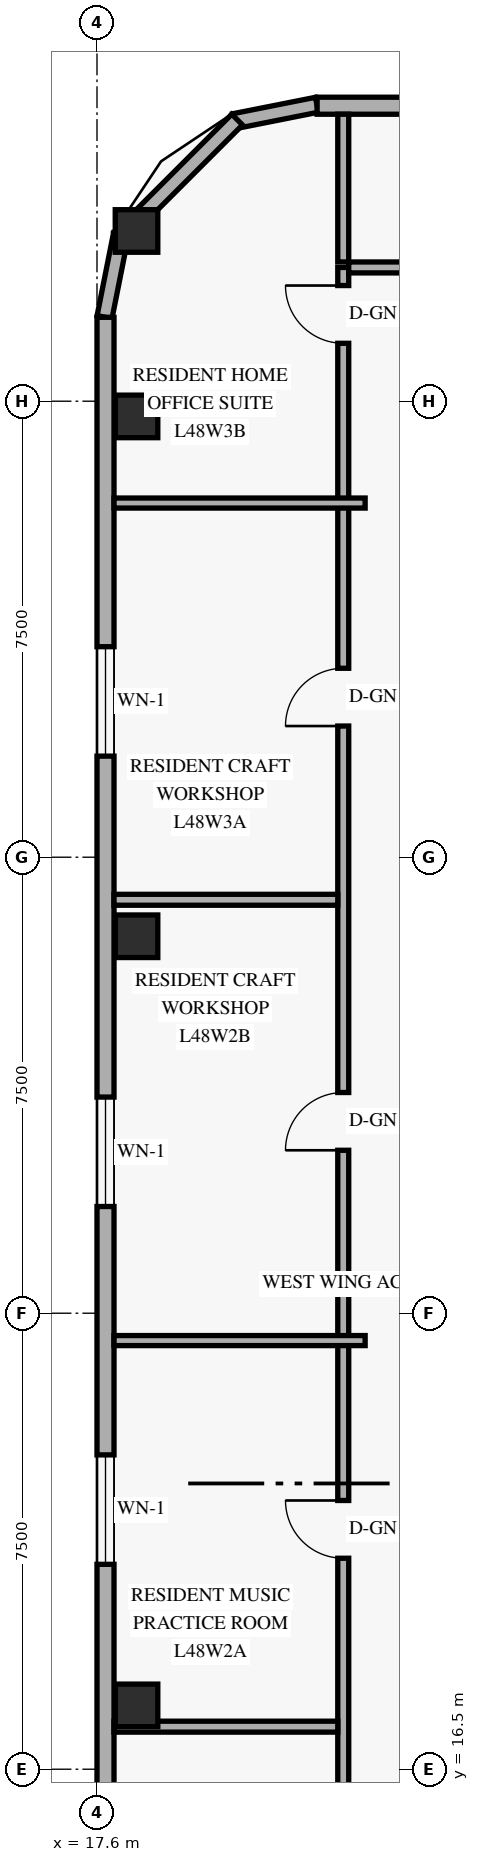
"""IFC4 building model, lengths in metres.
Left out: names, types, materials, properties, quantities, classifications, styles, units other than length and angle.
Written with IfcOpenShell. Run it as: python <this file> out.ifc"""

import sys

from ifc_helpers import new_model, si_unit, direction, frame, frame_2d, origin, origin_2d, place, context, subcontext, project, spatial, rectangle, extrude, element, fill, save


model = new_model("IFC4")
c1 = context("Model", 3, precision=1e-05, world=origin(), true_north=direction((0.0, 1.0)))
c2 = subcontext(c1, "Body", "Model", "MODEL_VIEW")
j1 = project(units=[si_unit("LENGTHUNIT", "METRE"), si_unit("PLANEANGLEUNIT", "RADIAN")], contexts=[c1])
p1 = place(None, origin())
s1 = spatial("IfcSite", under=j1, at=p1, CompositionType="ELEMENT")
p2 = place(p1, origin())
s2 = spatial("IfcBuilding", under=s1, at=p2, CompositionType="ELEMENT")
p3 = place(p2, frame((0.0, 0.0, 184.8)))
s3 = spatial("IfcBuildingStorey", under=s2, at=p3, CompositionType="ELEMENT", Elevation=184.8)
for number, where, z_axis, x_axis in (
    (1, (18.25, 17.55, 0.0), (0.0, 0.0, 1.0), (1.0, 0.0, 0.0)),
    (2, (18.25, 30.2, 0.0), (0.0, 0.0, 1.0), (1.0, 0.0, 0.0)),
    (3, (18.25, 38.75, 0.0), (0.0, 0.0, 1.0), (1.0, 0.0, 0.0)),
    (4, (18.25, 41.8, 0.0), (0.0, 0.0, 1.0), (1.0, 0.0, 0.0)),
):
    element("IfcColumn", number, at=place(p3, frame(where, z_axis=z_axis, x_axis=x_axis)), inside=s3, PredefinedType="COLUMN", context=c2, shape_type="SweptSolid", body=[
        extrude(rectangle(XDim=0.7, YDim=0.7, at=origin_2d()), origin(), (0.0, 0.0, 1.0), 3.6),
    ])
p4 = place(p3, frame((21.217, 43.876, 0.0), z_axis=(0.0, 0.0, 1.0), x_axis=(-0.980809899341, -0.19496651342, 0.0)))
e5 = element("IfcWall", 5, at=p4, inside=s3, PredefinedType="SOLIDWALL", context=c2, shape_type="SweptSolid", body=[
    extrude(rectangle(XDim=1.389, YDim=0.25, at=frame_2d((0.694, 0.0))), origin(), (0.0, 0.0, 1.0), 3.36),
])
p5 = place(p3, frame((19.905, 43.632, 0.0), z_axis=(0.0, 0.0, 1.0), x_axis=(-0.707106781187, -0.707106781187, 0.0)))
e6 = element("IfcWall", 6, at=p5, inside=s3, PredefinedType="SOLIDWALL", context=c2, shape_type="SweptSolid", body=[
    extrude(rectangle(XDim=2.739, YDim=0.25, at=frame_2d((1.37, 0.0))), origin(), (0.0, 0.0, 1.0), 3.36),
])
p6 = place(p3, frame((17.995, 41.746, 0.0), z_axis=(0.0, 0.0, 1.0), x_axis=(-0.195135625965, -0.9807762678, 0.0)))
e7 = element("IfcWall", 7, at=p6, inside=s3, PredefinedType="SOLIDWALL", context=c2, shape_type="SweptSolid", body=[
    extrude(rectangle(XDim=1.389, YDim=0.25, at=frame_2d((0.694, 0.0))), origin(), (0.0, 0.0, 1.0), 3.36),
])
p7 = place(p3, frame((54.98, 43.86, 0.0), z_axis=(0.0, 0.0, 1.0), x_axis=(-1.0, 0.0, 0.0)))
e8 = element("IfcWall", 8, at=p7, inside=s3, PredefinedType="SOLIDWALL", context=c2, shape_type="SweptSolid", body=[
    extrude(rectangle(XDim=33.76, YDim=0.28, at=frame_2d((16.88, 0.0))), origin(), (0.0, 0.0, 1.0), 3.36),
])
p8 = place(p7, frame((28.555, 0.0, 0.85)))
e9 = element("IfcOpeningElement", 9, at=p8, cuts=e8, PredefinedType="OPENING", context=c2, shape_type="SweptSolid", body=[
    extrude(rectangle(XDim=1.65, YDim=1.6, at=frame_2d((0.825, 0.8))), frame((0.0, 0.15, 0.0), z_axis=(0.0, -1.0, 0.0), x_axis=(1.0, 0.0, 0.0)), (0.0, 0.0, 1.0), 0.3),
])
p9 = place(p7, frame((21.67, 0.0, 0.85)))
e10 = element("IfcOpeningElement", 10, at=p9, cuts=e8, PredefinedType="OPENING", context=c2, shape_type="SweptSolid", body=[
    extrude(rectangle(XDim=1.65, YDim=1.6, at=frame_2d((0.825, 0.8))), frame((0.0, 0.15, 0.0), z_axis=(0.0, -1.0, 0.0), x_axis=(1.0, 0.0, 0.0)), (0.0, 0.0, 1.0), 0.3),
])
p10 = place(p7, frame((14.957, 0.0, 0.85)))
e11 = element("IfcOpeningElement", 11, at=p10, cuts=e8, PredefinedType="OPENING", context=c2, shape_type="SweptSolid", body=[
    extrude(rectangle(XDim=1.65, YDim=1.6, at=frame_2d((0.825, 0.8))), frame((0.0, 0.15, 0.0), z_axis=(0.0, -1.0, 0.0), x_axis=(1.0, 0.0, 0.0)), (0.0, 0.0, 1.0), 0.3),
])
p11 = place(p7, frame((9.108, 0.0, 0.85)))
e12 = element("IfcOpeningElement", 12, at=p11, cuts=e8, PredefinedType="OPENING", context=c2, shape_type="SweptSolid", body=[
    extrude(rectangle(XDim=1.65, YDim=1.6, at=frame_2d((0.825, 0.8))), frame((0.0, 0.15, 0.0), z_axis=(0.0, -1.0, 0.0), x_axis=(1.0, 0.0, 0.0)), (0.0, 0.0, 1.0), 0.3),
])
p12 = place(p7, frame((6.363, 0.0, 0.85)))
e13 = element("IfcOpeningElement", 13, at=p12, cuts=e8, PredefinedType="OPENING", context=c2, shape_type="SweptSolid", body=[
    extrude(rectangle(XDim=1.2, YDim=1.5, at=frame_2d((0.6, 0.75))), frame((0.0, 0.15, 0.0), z_axis=(0.0, -1.0, 0.0), x_axis=(1.0, 0.0, 0.0)), (0.0, 0.0, 1.0), 0.3),
])
p13 = place(p7, frame((2.207, 0.0, 0.85)))
e14 = element("IfcOpeningElement", 14, at=p13, cuts=e8, PredefinedType="OPENING", context=c2, shape_type="SweptSolid", body=[
    extrude(rectangle(XDim=1.65, YDim=1.6, at=frame_2d((0.825, 0.8))), frame((0.0, 0.15, 0.0), z_axis=(0.0, -1.0, 0.0), x_axis=(1.0, 0.0, 0.0)), (0.0, 0.0, 1.0), 0.3),
])
p14 = place(p3, frame((17.74, 40.38, 0.0), z_axis=(0.0, 0.0, 1.0), x_axis=(0.0, -1.0, 0.0)))
e15 = element("IfcWall", 15, at=p14, inside=s3, PredefinedType="SOLIDWALL", context=c2, shape_type="SweptSolid", body=[
    extrude(rectangle(XDim=32.76, YDim=0.28, at=frame_2d((16.38, 0.0))), origin(), (0.0, 0.0, 1.0), 3.36),
])
p15 = place(p14, frame((25.363, 0.0, 0.85)))
e16 = element("IfcOpeningElement", 16, at=p15, cuts=e15, PredefinedType="OPENING", context=c2, shape_type="SweptSolid", body=[
    extrude(rectangle(XDim=1.8, YDim=1.6, at=frame_2d((0.9, 0.8))), frame((0.0, 0.15, 0.0), z_axis=(0.0, -1.0, 0.0), x_axis=(1.0, 0.0, 0.0)), (0.0, 0.0, 1.0), 0.3),
])
p16 = place(p14, frame((18.71, 0.0, 0.85)))
e17 = element("IfcOpeningElement", 17, at=p16, cuts=e15, PredefinedType="OPENING", context=c2, shape_type="SweptSolid", body=[
    extrude(rectangle(XDim=1.8, YDim=1.6, at=frame_2d((0.9, 0.8))), frame((0.0, 0.15, 0.0), z_axis=(0.0, -1.0, 0.0), x_axis=(1.0, 0.0, 0.0)), (0.0, 0.0, 1.0), 0.3),
])
p17 = place(p14, frame((12.825, 0.0, 0.85)))
e18 = element("IfcOpeningElement", 18, at=p17, cuts=e15, PredefinedType="OPENING", context=c2, shape_type="SweptSolid", body=[
    extrude(rectangle(XDim=1.8, YDim=1.6, at=frame_2d((0.9, 0.8))), frame((0.0, 0.15, 0.0), z_axis=(0.0, -1.0, 0.0), x_axis=(1.0, 0.0, 0.0)), (0.0, 0.0, 1.0), 0.3),
])
p18 = place(p14, frame((5.417, 0.0, 0.85)))
e19 = element("IfcOpeningElement", 19, at=p18, cuts=e15, PredefinedType="OPENING", context=c2, shape_type="SweptSolid", body=[
    extrude(rectangle(XDim=1.8, YDim=1.6, at=frame_2d((0.9, 0.8))), frame((0.0, 0.15, 0.0), z_axis=(0.0, -1.0, 0.0), x_axis=(1.0, 0.0, 0.0)), (0.0, 0.0, 1.0), 0.3),
])
p19 = place(p3, frame((21.65, 6.8, 0.0), z_axis=(0.0, 0.0, 1.0), x_axis=(0.0, 1.0, 0.0)))
e20 = element("IfcWall", 20, at=p19, inside=s3, PredefinedType="STANDARD", context=c2, shape_type="SweptSolid", body=[
    extrude(rectangle(XDim=34.4, YDim=0.18, at=frame_2d((17.2, 0.0))), origin(), (0.0, 0.0, 1.0), 2.73),
])
p20 = place(p19, frame((0.433, 0.0, 0.0)))
e21 = element("IfcOpeningElement", 21, at=p20, cuts=e20, PredefinedType="OPENING", context=c2, shape_type="SweptSolid", body=[
    extrude(rectangle(XDim=0.95, YDim=2.15, at=frame_2d((0.475, 1.075))), frame((0.0, 0.1, 0.0), z_axis=(0.0, -1.0, 0.0), x_axis=(1.0, 0.0, 0.0)), (0.0, 0.0, 1.0), 0.2),
])
p21 = place(p19, frame((6.867, 0.0, 0.0)))
e22 = element("IfcOpeningElement", 22, at=p21, cuts=e20, PredefinedType="OPENING", context=c2, shape_type="SweptSolid", body=[
    extrude(rectangle(XDim=0.95, YDim=2.15, at=frame_2d((0.475, 1.075))), frame((0.0, 0.1, 0.0), z_axis=(0.0, -1.0, 0.0), x_axis=(1.0, 0.0, 0.0)), (0.0, 0.0, 1.0), 0.2),
])
p22 = place(p19, frame((13.17, 0.0, 0.0)))
e23 = element("IfcOpeningElement", 23, at=p22, cuts=e20, PredefinedType="OPENING", context=c2, shape_type="SweptSolid", body=[
    extrude(rectangle(XDim=0.95, YDim=2.15, at=frame_2d((0.475, 1.075))), frame((0.0, 0.1, 0.0), z_axis=(0.0, -1.0, 0.0), x_axis=(1.0, 0.0, 0.0)), (0.0, 0.0, 1.0), 0.2),
])
p23 = place(p19, frame((19.88, 0.0, 0.0)))
e24 = element("IfcOpeningElement", 24, at=p23, cuts=e20, PredefinedType="OPENING", context=c2, shape_type="SweptSolid", body=[
    extrude(rectangle(XDim=0.95, YDim=2.15, at=frame_2d((0.475, 1.075))), frame((0.0, 0.1, 0.0), z_axis=(0.0, -1.0, 0.0), x_axis=(1.0, 0.0, 0.0)), (0.0, 0.0, 1.0), 0.2),
])
p24 = place(p19, frame((26.857, 0.0, 0.0)))
e25 = element("IfcOpeningElement", 25, at=p24, cuts=e20, PredefinedType="OPENING", context=c2, shape_type="SweptSolid", body=[
    extrude(rectangle(XDim=0.95, YDim=2.15, at=frame_2d((0.475, 1.075))), frame((0.0, 0.1, 0.0), z_axis=(0.0, -1.0, 0.0), x_axis=(1.0, 0.0, 0.0)), (0.0, 0.0, 1.0), 0.2),
])
p25 = place(p19, frame((33.153, 0.0, 0.0)))
e26 = element("IfcOpeningElement", 26, at=p25, cuts=e20, PredefinedType="OPENING", context=c2, shape_type="SweptSolid", body=[
    extrude(rectangle(XDim=0.95, YDim=2.15, at=frame_2d((0.475, 1.075))), frame((0.0, 0.1, 0.0), z_axis=(0.0, -1.0, 0.0), x_axis=(1.0, 0.0, 0.0)), (0.0, 0.0, 1.0), 0.2),
])
p26 = place(p3, frame((21.74, 41.2, 0.0), z_axis=(0.0, 0.0, 1.0), x_axis=(1.0, 0.0, 0.0)))
e27 = element("IfcWall", 27, at=p26, inside=s3, PredefinedType="STANDARD", context=c2, shape_type="SweptSolid", body=[
    extrude(rectangle(XDim=13.68, YDim=0.18, at=frame_2d((6.84, 0.0))), origin(), (0.0, 0.0, 1.0), 2.73),
])
p27 = place(p26, frame((2.95, 0.0, 0.0)))
e28 = element("IfcOpeningElement", 28, at=p27, cuts=e27, PredefinedType="OPENING", context=c2, shape_type="SweptSolid", body=[
    extrude(rectangle(XDim=0.95, YDim=2.15, at=frame_2d((0.475, 1.075))), frame((0.0, 0.1, 0.0), z_axis=(0.0, -1.0, 0.0), x_axis=(1.0, 0.0, 0.0)), (0.0, 0.0, 1.0), 0.2),
])
p28 = place(p26, frame((10.11, 0.0, 0.0)))
e29 = element("IfcOpeningElement", 29, at=p28, cuts=e27, PredefinedType="OPENING", context=c2, shape_type="SweptSolid", body=[
    extrude(rectangle(XDim=0.95, YDim=2.15, at=frame_2d((0.475, 1.075))), frame((0.0, 0.1, 0.0), z_axis=(0.0, -1.0, 0.0), x_axis=(1.0, 0.0, 0.0)), (0.0, 0.0, 1.0), 0.2),
])
p29 = place(p3, frame((21.65, 41.29, 0.0), z_axis=(0.0, 0.0, 1.0), x_axis=(0.0, 1.0, 0.0)))
e30 = element("IfcWall", 30, at=p29, inside=s3, PredefinedType="PARTITIONING", context=c2, shape_type="SweptSolid", body=[
    extrude(rectangle(XDim=2.43, YDim=0.18, at=frame_2d((1.215, 0.0))), origin(), (0.0, 0.0, 1.0), 2.879),
])
p30 = place(p3, frame((17.88, 17.2, 0.0), z_axis=(0.0, 0.0, 1.0), x_axis=(1.0, 0.0, 0.0)))
e31 = element("IfcWall", 31, at=p30, inside=s3, PredefinedType="PARTITIONING", context=c2, shape_type="SweptSolid", body=[
    extrude(rectangle(XDim=3.68, YDim=0.18, at=frame_2d((1.84, 0.0))), origin(), (0.0, 0.0, 1.0), 2.879),
])
p31 = place(p3, frame((17.88, 23.55, 0.0), z_axis=(0.0, 0.0, 1.0), x_axis=(1.0, 0.0, 0.0)))
e32 = element("IfcWall", 32, at=p31, inside=s3, PredefinedType="PARTITIONING", context=c2, shape_type="SweptSolid", body=[
    extrude(rectangle(XDim=4.13, YDim=0.165, at=frame_2d((2.065, 0.0))), origin(), (0.0, 0.0, 1.0), 2.879),
])
p32 = place(p3, frame((17.88, 30.8, 0.0), z_axis=(0.0, 0.0, 1.0), x_axis=(1.0, 0.0, 0.0)))
e33 = element("IfcWall", 33, at=p32, inside=s3, PredefinedType="PARTITIONING", context=c2, shape_type="SweptSolid", body=[
    extrude(rectangle(XDim=3.68, YDim=0.18, at=frame_2d((1.84, 0.0))), origin(), (0.0, 0.0, 1.0), 2.879),
])
p33 = place(p3, frame((17.88, 37.325, 0.0), z_axis=(0.0, 0.0, 1.0), x_axis=(1.0, 0.0, 0.0)))
e34 = element("IfcWall", 34, at=p33, inside=s3, PredefinedType="PARTITIONING", context=c2, shape_type="SweptSolid", body=[
    extrude(rectangle(XDim=4.13, YDim=0.165, at=frame_2d((2.065, 0.0))), origin(), (0.0, 0.0, 1.0), 2.879),
])
p34 = place(p16, origin())
e35 = element("IfcWindow", 35, at=p34, inside=s3, PartitioningType="SINGLE_PANEL", PredefinedType="WINDOW", context=c2, shape_type="SweptSolid", body=[
    extrude(rectangle(XDim=1.8, YDim=1.6, at=frame_2d((0.9, 0.8))), frame((0.0, 0.03, 0.0), z_axis=(0.0, -1.0, 0.0), x_axis=(1.0, 0.0, 0.0)), (0.0, 0.0, 1.0), 0.06),
])
fill(e17, e35)
p35 = place(p17, origin())
e36 = element("IfcWindow", 36, at=p35, inside=s3, PartitioningType="SINGLE_PANEL", PredefinedType="WINDOW", context=c2, shape_type="SweptSolid", body=[
    extrude(rectangle(XDim=1.8, YDim=1.6, at=frame_2d((0.9, 0.8))), frame((0.0, 0.03, 0.0), z_axis=(0.0, -1.0, 0.0), x_axis=(1.0, 0.0, 0.0)), (0.0, 0.0, 1.0), 0.06),
])
fill(e18, e36)
p36 = place(p18, origin())
e37 = element("IfcWindow", 37, at=p36, inside=s3, PartitioningType="SINGLE_PANEL", PredefinedType="WINDOW", context=c2, shape_type="SweptSolid", body=[
    extrude(rectangle(XDim=1.8, YDim=1.6, at=frame_2d((0.9, 0.8))), frame((0.0, 0.03, 0.0), z_axis=(0.0, -1.0, 0.0), x_axis=(1.0, 0.0, 0.0)), (0.0, 0.0, 1.0), 0.06),
])
fill(e19, e37)
p37 = place(p22, origin())
e38 = element("IfcDoor", 38, at=p37, inside=s3, OperationType="SINGLE_SWING_RIGHT", PredefinedType="DOOR", context=c2, shape_type="SweptSolid", body=[
    extrude(rectangle(XDim=0.95, YDim=2.15, at=frame_2d((0.475, 1.075))), frame((0.0, 0.025, 0.0), z_axis=(0.0, -1.0, 0.0), x_axis=(1.0, 0.0, 0.0)), (0.0, 0.0, 1.0), 0.05),
])
fill(e23, e38)
p38 = place(p23, origin())
e39 = element("IfcDoor", 39, at=p38, inside=s3, OperationType="SINGLE_SWING_LEFT", PredefinedType="DOOR", context=c2, shape_type="SweptSolid", body=[
    extrude(rectangle(XDim=0.95, YDim=2.15, at=frame_2d((0.475, 1.075))), frame((0.0, 0.025, 0.0), z_axis=(0.0, -1.0, 0.0), x_axis=(1.0, 0.0, 0.0)), (0.0, 0.0, 1.0), 0.05),
])
fill(e24, e39)
p39 = place(p24, origin())
e40 = element("IfcDoor", 40, at=p39, inside=s3, OperationType="SINGLE_SWING_LEFT", PredefinedType="DOOR", context=c2, shape_type="SweptSolid", body=[
    extrude(rectangle(XDim=0.95, YDim=2.15, at=frame_2d((0.475, 1.075))), frame((0.0, 0.025, 0.0), z_axis=(0.0, -1.0, 0.0), x_axis=(1.0, 0.0, 0.0)), (0.0, 0.0, 1.0), 0.05),
])
fill(e25, e40)
p40 = place(p25, origin())
e41 = element("IfcDoor", 41, at=p40, inside=s3, OperationType="SINGLE_SWING_RIGHT", PredefinedType="DOOR", context=c2, shape_type="SweptSolid", body=[
    extrude(rectangle(XDim=0.95, YDim=2.15, at=frame_2d((0.475, 1.075))), frame((0.0, 0.025, 0.0), z_axis=(0.0, -1.0, 0.0), x_axis=(1.0, 0.0, 0.0)), (0.0, 0.0, 1.0), 0.05),
])
fill(e26, e41)
save(model, sys.argv[1])
